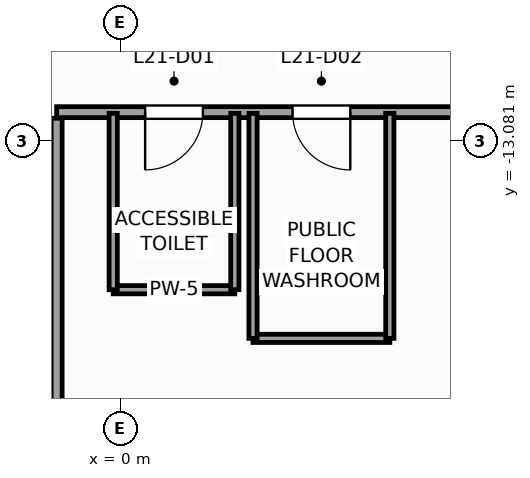
"""IFC4 building model, lengths in metres.
Left out: names, types, materials, properties, quantities, classifications, styles, units other than length and angle.
Written with IfcOpenShell. Run it as: python <this file> out.ifc"""

import sys

from ifc_helpers import new_model, si_unit, direction, frame, frame_2d, origin, place, context, subcontext, project, spatial, rectangle, extrude, source, transform, mapped, element, fill, save


model = new_model("IFC4")
c1 = context("Model", 3, precision=1e-05, world=origin(), true_north=direction((0.0, 1.0)))
c2 = subcontext(c1, "Body", "Model", "MODEL_VIEW")
j1 = project(units=[si_unit("LENGTHUNIT", "METRE"), si_unit("PLANEANGLEUNIT", "RADIAN")], contexts=[c1])
p1 = place(None, origin())
s1 = spatial("IfcSite", under=j1, at=p1, CompositionType="ELEMENT")
p2 = place(p1, origin())
s2 = spatial("IfcBuilding", under=s1, at=p2, CompositionType="ELEMENT")
p3 = place(p2, frame((0.0, 0.0, 91.2)))
s3 = spatial("IfcBuildingStorey", under=s2, at=p3, CompositionType="ELEMENT", Elevation=91.2)
p4 = place(p3, frame((-1.05, -12.6, 0.0), z_axis=(0.0, 0.0, 1.0), x_axis=(1.0, 0.0, 0.0)))
e1 = element("IfcWall", 1, at=p4, inside=s3, PredefinedType="PARTITIONING", context=c2, shape_type="SweptSolid", body=[
    extrude(rectangle(XDim=11.5, YDim=0.18, at=frame_2d((5.75, 0.0))), origin(), (0.0, 0.0, 1.0), 3.74),
])
p5 = place(p4, frame((1.455, 0.0, 0.0)))
e2 = element("IfcOpeningElement", 2, at=p5, cuts=e1, PredefinedType="OPENING", context=c2, shape_type="SweptSolid", body=[
    extrude(rectangle(XDim=0.95, YDim=2.1, at=frame_2d((0.475, 1.05))), frame((0.0, 0.1, 0.0), z_axis=(0.0, -1.0, 0.0), x_axis=(1.0, 0.0, 0.0)), (0.0, 0.0, 1.0), 0.2),
])
p6 = place(p4, frame((3.879, 0.0, 0.0)))
e3 = element("IfcOpeningElement", 3, at=p6, cuts=e1, PredefinedType="OPENING", context=c2, shape_type="SweptSolid", body=[
    extrude(rectangle(XDim=0.95, YDim=2.1, at=frame_2d((0.475, 1.05))), frame((0.0, 0.1, 0.0), z_axis=(0.0, -1.0, 0.0), x_axis=(1.0, 0.0, 0.0)), (0.0, 0.0, 1.0), 0.2),
])
p7 = place(p3, frame((-1.05, -28.487, 0.0), z_axis=(0.0, 0.0, 1.0), x_axis=(0.0, 1.0, 0.0)))
e4 = element("IfcWall", 4, at=p7, inside=s3, PredefinedType="PARTITIONING", context=c2, shape_type="SweptSolid", body=[
    extrude(rectangle(XDim=15.787, YDim=0.18, at=frame_2d((7.894, 0.0))), origin(), (0.0, 0.0, 1.0), 3.74),
])
p8 = place(p3, frame((-0.12, -15.52, 0.0), z_axis=(0.0, 0.0, 1.0), x_axis=(1.0, 0.0, 0.0)))
e5 = element("IfcWall", 5, at=p8, inside=s3, PredefinedType="PARTITIONING", context=c2, shape_type="SweptSolid", body=[
    extrude(rectangle(XDim=2.0, YDim=0.135, at=frame_2d((1.0, 0.0))), origin(), (0.0, 0.0, 1.0), 3.24),
])
for number, where, z_axis, x_axis in (
    (6, (1.88, -15.52, 0.0), (0.0, 0.0, 1.0), (0.0, 1.0, 0.0)),
    (7, (-0.12, -15.52, 0.0), (0.0, 0.0, 1.0), (0.0, 1.0, 0.0)),
):
    element("IfcWall", number, at=place(p3, frame(where, z_axis=z_axis, x_axis=x_axis)), inside=s3, PredefinedType="PARTITIONING", context=c2, shape_type="SweptSolid", body=[
        extrude(rectangle(XDim=2.9, YDim=0.135, at=frame_2d((1.45, 0.0))), origin(), (0.0, 0.0, 1.0), 3.74),
    ])
p9 = place(p3, frame((2.179, -16.32, 0.0), z_axis=(0.0, 0.0, 1.0), x_axis=(1.0, 0.0, 0.0)))
e8 = element("IfcWall", 8, at=p9, inside=s3, PredefinedType="PARTITIONING", context=c2, shape_type="SweptSolid", body=[
    extrude(rectangle(XDim=2.25, YDim=0.135, at=frame_2d((1.125, 0.0))), origin(), (0.0, 0.0, 1.0), 3.74),
])
for number, where, z_axis, x_axis in (
    (9, (4.429, -16.32, 0.0), (0.0, 0.0, 1.0), (0.0, 1.0, 0.0)),
    (10, (2.179, -16.32, 0.0), (0.0, 0.0, 1.0), (0.0, 1.0, 0.0)),
):
    element("IfcWall", number, at=place(p3, frame(where, z_axis=z_axis, x_axis=x_axis)), inside=s3, PredefinedType="PARTITIONING", context=c2, shape_type="SweptSolid", body=[
        extrude(rectangle(XDim=3.7, YDim=0.135, at=frame_2d((1.85, 0.0))), origin(), (0.0, 0.0, 1.0), 3.74),
    ])
m1 = source(origin(), c2, "Body", "SweptSolid", [
    extrude(rectangle(XDim=0.95, YDim=2.1, at=frame_2d((0.475, 1.05))), frame((0.0, 0.025, 0.0), z_axis=(0.0, -1.0, 0.0), x_axis=(1.0, 0.0, 0.0)), (0.0, 0.0, 1.0), 0.05),
])
p10 = place(p5, frame((0.95, 0.0, 0.0), z_axis=(0.0, 0.0, 1.0), x_axis=(-1.0, 0.0, 0.0)))
e11 = element("IfcDoor", 11, at=p10, inside=s3, OperationType="SINGLE_SWING_LEFT", PredefinedType="DOOR", context=c2, shape_type="MappedRepresentation", body=[
    mapped(m1, transform((0.0, 0.0, 0.0), scale=1.0)),
])
fill(e2, e11)
p11 = place(p6, frame((0.95, 0.0, 0.0), z_axis=(0.0, 0.0, 1.0), x_axis=(-1.0, 0.0, 0.0)))
e12 = element("IfcDoor", 12, at=p11, inside=s3, OperationType="SINGLE_SWING_RIGHT", PredefinedType="DOOR", context=c2, shape_type="MappedRepresentation", body=[
    mapped(m1, transform((0.0, 0.0, 0.0), scale=1.0)),
])
fill(e3, e12)
save(model, sys.argv[1])
